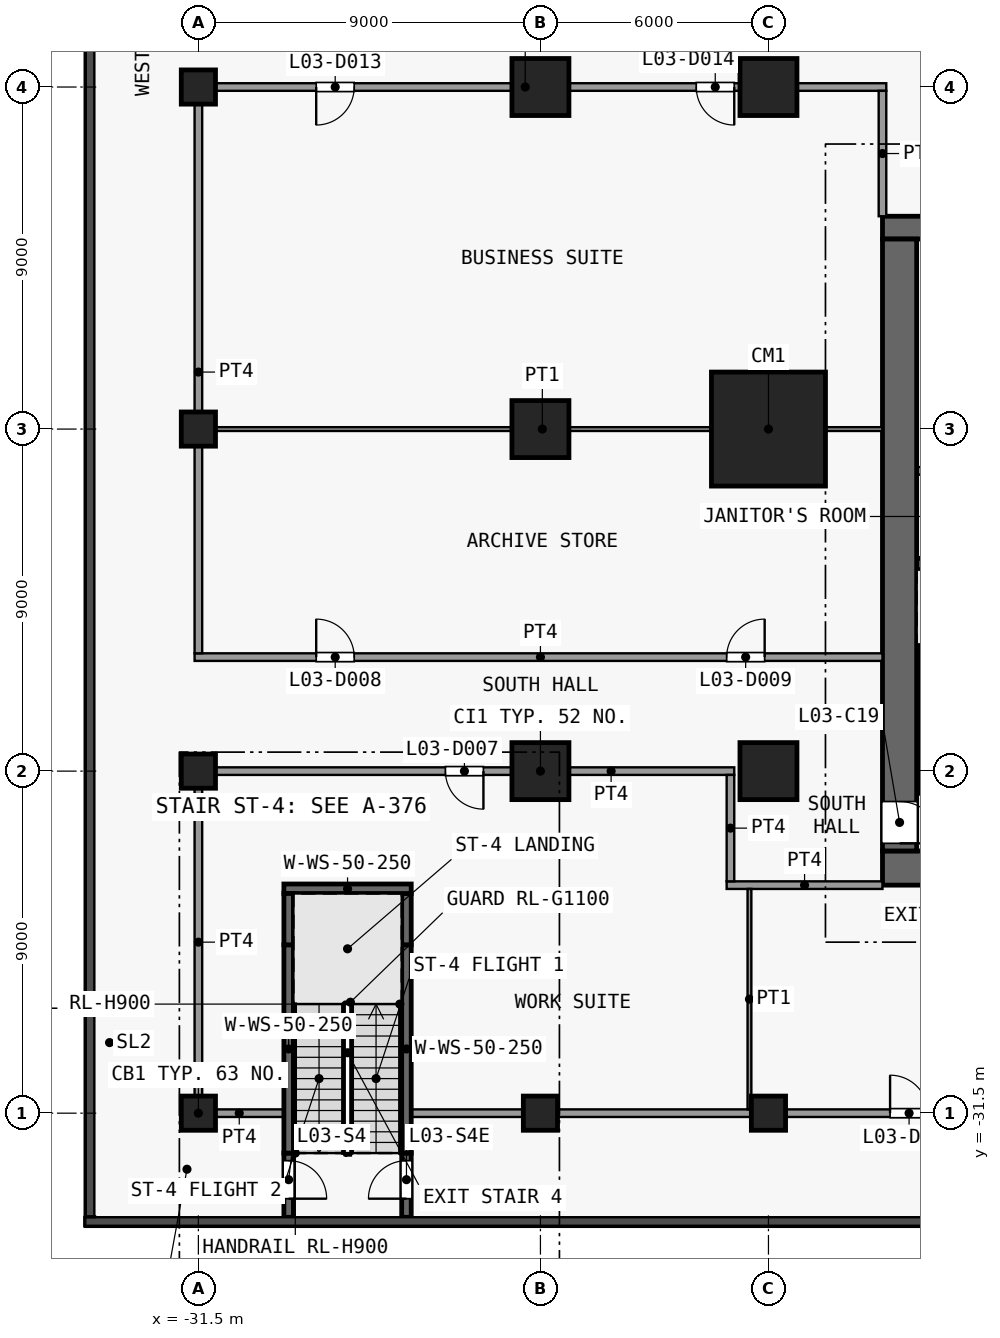
"""IFC4 building model, lengths in metres.
Left out: names, types, materials, properties, quantities, classifications, styles, units other than length and angle.
Written with IfcOpenShell. Run it as: python <this file> out.ifc"""

import sys

from ifc_helpers import new_model, si_unit, direction, frame, frame_2d, origin, origin_2d, place, context, subcontext, project, spatial, rectangle, extrude, element, fill, save


model = new_model("IFC4")
c1 = context("Model", 3, precision=1e-05, world=origin(), true_north=direction((0.0, 1.0)))
c2 = subcontext(c1, "Body", "Model", "MODEL_VIEW")
j1 = project(units=[si_unit("LENGTHUNIT", "METRE"), si_unit("PLANEANGLEUNIT", "RADIAN")], contexts=[c1])
p1 = place(None, origin())
s1 = spatial("IfcSite", under=j1, at=p1, CompositionType="ELEMENT")
p2 = place(p1, origin())
s2 = spatial("IfcBuilding", under=s1, at=p2, CompositionType="ELEMENT")
p3 = place(p2, frame((0.0, 0.0, 18.5)))
s3 = spatial("IfcBuildingStorey", under=s2, at=p3, CompositionType="ELEMENT", Elevation=18.5)
for number, where, z_axis, x_axis in (
    (1, (-31.5, -31.5, 0.0), (0.0, 0.0, 1.0), (1.0, 0.0, 0.0)),
    (2, (-31.5, -22.5, 0.0), (0.0, 0.0, 1.0), (1.0, 0.0, 0.0)),
    (3, (-31.5, -13.5, 0.0), (0.0, 0.0, 1.0), (1.0, 0.0, 0.0)),
    (4, (-31.5, -4.5, 0.0), (0.0, 0.0, 1.0), (1.0, 0.0, 0.0)),
    (5, (-22.5, -31.5, 0.0), (0.0, 0.0, 1.0), (1.0, 0.0, 0.0)),
):
    element("IfcColumn", number, at=place(p3, frame(where, z_axis=z_axis, x_axis=x_axis)), inside=s3, PredefinedType="COLUMN", context=c2, shape_type="SweptSolid", body=[
        extrude(rectangle(XDim=0.9, YDim=0.9, at=origin_2d()), origin(), (0.0, 0.0, 1.0), 5.0),
    ])
for number, where, z_axis, x_axis in (
    (6, (-22.5, -22.5, 0.0), (0.0, 0.0, 1.0), (1.0, 0.0, 0.0)),
    (7, (-22.5, -13.5, 0.0), (0.0, 0.0, 1.0), (1.0, 0.0, 0.0)),
    (8, (-22.5, -4.5, 0.0), (0.0, 0.0, 1.0), (1.0, 0.0, 0.0)),
):
    element("IfcColumn", number, at=place(p3, frame(where, z_axis=z_axis, x_axis=x_axis)), inside=s3, PredefinedType="COLUMN", context=c2, shape_type="SweptSolid", body=[
        extrude(rectangle(XDim=1.5, YDim=1.5, at=origin_2d()), origin(), (0.0, 0.0, 1.0), 5.0),
    ])
p4 = place(p3, frame((-16.5, -31.5, 0.0), z_axis=(0.0, 0.0, 1.0), x_axis=(1.0, 0.0, 0.0)))
e9 = element("IfcColumn", 9, at=p4, inside=s3, PredefinedType="COLUMN", context=c2, shape_type="SweptSolid", body=[
    extrude(rectangle(XDim=0.9, YDim=0.9, at=origin_2d()), origin(), (0.0, 0.0, 1.0), 5.0),
])
p5 = place(p3, frame((-16.5, -22.5, 0.0), z_axis=(0.0, 0.0, 1.0), x_axis=(1.0, 0.0, 0.0)))
e10 = element("IfcColumn", 10, at=p5, inside=s3, PredefinedType="COLUMN", context=c2, shape_type="SweptSolid", body=[
    extrude(rectangle(XDim=1.5, YDim=1.5, at=origin_2d()), origin(), (0.0, 0.0, 1.0), 5.0),
])
p6 = place(p3, frame((-16.5, -13.5, 0.0), z_axis=(0.0, 0.0, 1.0), x_axis=(1.0, 0.0, 0.0)))
e11 = element("IfcColumn", 11, at=p6, inside=s3, PredefinedType="COLUMN", context=c2, shape_type="SweptSolid", body=[
    extrude(rectangle(XDim=3.0, YDim=3.0, at=origin_2d()), origin(), (0.0, 0.0, 1.0), 5.0),
])
p7 = place(p3, frame((-16.5, -4.5, 0.0), z_axis=(0.0, 0.0, 1.0), x_axis=(1.0, 0.0, 0.0)))
e12 = element("IfcColumn", 12, at=p7, inside=s3, PredefinedType="COLUMN", context=c2, shape_type="SweptSolid", body=[
    extrude(rectangle(XDim=1.5, YDim=1.5, at=origin_2d()), origin(), (0.0, 0.0, 1.0), 5.0),
])
p8 = place(p3, frame((-13.5, -25.05, 0.0), z_axis=(0.0, 0.0, 1.0), x_axis=(1.0, 0.0, 0.0)))
e13 = element("IfcWall", 13, at=p8, inside=s3, PredefinedType="SHEAR", context=c2, shape_type="SweptSolid", body=[
    extrude(rectangle(XDim=27.0, YDim=0.9, at=frame_2d((13.5, 0.0))), origin(), (0.0, 0.0, 1.0), 4.65),
])
p9 = place(p3, frame((-13.5, -8.2, 0.0), z_axis=(0.0, 0.0, 1.0), x_axis=(1.0, 0.0, 0.0)))
e14 = element("IfcWall", 14, at=p9, inside=s3, PredefinedType="SHEAR", context=c2, shape_type="SweptSolid", body=[
    extrude(rectangle(XDim=27.0, YDim=0.6, at=frame_2d((13.5, 0.0))), origin(), (0.0, 0.0, 1.0), 4.65),
])
p10 = place(p9, frame((7.8, 0.0, 0.0)))
e15 = element("IfcOpeningElement", 15, at=p10, cuts=e14, PredefinedType="OPENING", context=c2, shape_type="SweptSolid", body=[
    extrude(rectangle(XDim=1.8, YDim=2.1, at=frame_2d((0.9, 1.05))), frame((0.0, 0.31, 0.0), z_axis=(0.0, -1.0, 0.0), x_axis=(1.0, 0.0, 0.0)), (0.0, 0.0, 1.0), 0.62),
])
p11 = place(p9, frame((17.4, 0.0, 0.0)))
e16 = element("IfcOpeningElement", 16, at=p11, cuts=e14, PredefinedType="OPENING", context=c2, shape_type="SweptSolid", body=[
    extrude(rectangle(XDim=1.8, YDim=2.1, at=frame_2d((0.9, 1.05))), frame((0.0, 0.31, 0.0), z_axis=(0.0, -1.0, 0.0), x_axis=(1.0, 0.0, 0.0)), (0.0, 0.0, 1.0), 0.62),
])
p12 = place(p9, frame((2.725, 0.0, 0.0)))
e17 = element("IfcOpeningElement", 17, at=p12, cuts=e14, PredefinedType="OPENING", context=c2, shape_type="SweptSolid", body=[
    extrude(rectangle(XDim=0.9, YDim=2.1, at=frame_2d((0.45, 1.05))), frame((0.0, 0.31, 0.0), z_axis=(0.0, -1.0, 0.0), x_axis=(1.0, 0.0, 0.0)), (0.0, 0.0, 1.0), 0.62),
])
p13 = place(p9, frame((23.375, 0.0, 0.0)))
e18 = element("IfcOpeningElement", 18, at=p13, cuts=e14, PredefinedType="OPENING", context=c2, shape_type="SweptSolid", body=[
    extrude(rectangle(XDim=0.9, YDim=2.1, at=frame_2d((0.45, 1.05))), frame((0.0, 0.31, 0.0), z_axis=(0.0, -1.0, 0.0), x_axis=(1.0, 0.0, 0.0)), (0.0, 0.0, 1.0), 0.62),
])
p14 = place(p3, frame((-13.05, -8.5, 0.0), z_axis=(0.0, 0.0, 1.0), x_axis=(0.0, -1.0, 0.0)))
e19 = element("IfcWall", 19, at=p14, inside=s3, PredefinedType="SHEAR", context=c2, shape_type="SweptSolid", body=[
    extrude(rectangle(XDim=16.1, YDim=0.9, at=frame_2d((8.05, 0.0))), origin(), (0.0, 0.0, 1.0), 4.65),
])
p15 = place(p14, frame((14.8, 0.0, 0.0)))
e20 = element("IfcOpeningElement", 20, at=p15, cuts=e19, PredefinedType="OPENING", context=c2, shape_type="SweptSolid", body=[
    extrude(rectangle(XDim=1.1, YDim=2.1, at=frame_2d((0.55, 1.05))), frame((0.0, 0.46, 0.0), z_axis=(0.0, -1.0, 0.0), x_axis=(1.0, 0.0, 0.0)), (0.0, 0.0, 1.0), 0.92),
])
p16 = place(p3, frame((-12.6, -17.05, 0.0), z_axis=(0.0, 0.0, 1.0), x_axis=(1.0, 0.0, 0.0)))
e21 = element("IfcWall", 21, at=p16, inside=s3, PredefinedType="SHEAR", context=c2, shape_type="SweptSolid", body=[
    extrude(rectangle(XDim=2.85, YDim=0.3, at=frame_2d((1.425, 0.0))), origin(), (0.0, 0.0, 1.0), 4.65),
])
p17 = place(p3, frame((-12.6, -14.6, 0.0), z_axis=(0.0, 0.0, 1.0), x_axis=(1.0, 0.0, 0.0)))
e22 = element("IfcWall", 22, at=p17, inside=s3, PredefinedType="PARTITIONING", context=c2, shape_type="SweptSolid", body=[
    extrude(rectangle(XDim=1.45, YDim=0.2, at=frame_2d((0.725, 0.0))), origin(), (0.0, 0.0, 1.0), 4.65),
])
p18 = place(p3, frame((-29.125, -32.55, 0.0), z_axis=(0.0, 0.0, 1.0), x_axis=(0.0, -1.0, 0.0)))
e23 = element("IfcWall", 23, at=p18, inside=s3, PredefinedType="SHEAR", context=c2, shape_type="SweptSolid", body=[
    extrude(rectangle(XDim=1.69, YDim=0.25, at=frame_2d((0.845, 0.0))), origin(), (0.0, 0.0, 1.0), 4.65),
])
p19 = place(p18, frame((0.2, 0.0, 0.0)))
e24 = element("IfcOpeningElement", 24, at=p19, cuts=e23, PredefinedType="OPENING", context=c2, shape_type="SweptSolid", body=[
    extrude(rectangle(XDim=1.0, YDim=2.1, at=frame_2d((0.5, 1.05))), frame((0.0, 0.135, 0.0), z_axis=(0.0, -1.0, 0.0), x_axis=(1.0, 0.0, 0.0)), (0.0, 0.0, 1.0), 0.27),
])
p20 = place(p3, frame((-29.125, -32.55, 0.0), z_axis=(0.0, 0.0, 1.0), x_axis=(0.0, 1.0, 0.0)))
e25 = element("IfcWall", 25, at=p20, inside=s3, PredefinedType="SHEAR", context=c2, shape_type="SweptSolid", body=[
    extrude(rectangle(XDim=5.48, YDim=0.25, at=frame_2d((2.74, 0.0))), origin(), (0.0, 0.0, 1.0), 4.65),
])
p21 = place(p3, frame((-29.125, -27.07, 0.0), z_axis=(0.0, 0.0, 1.0), x_axis=(0.0, 1.0, 0.0)))
e26 = element("IfcWall", 26, at=p21, inside=s3, PredefinedType="SHEAR", context=c2, shape_type="SweptSolid", body=[
    extrude(rectangle(XDim=1.35, YDim=0.25, at=frame_2d((0.675, 0.0))), origin(), (0.0, 0.0, 1.0), 4.65),
])
p22 = place(p3, frame((-26.025, -34.24, 0.0), z_axis=(0.0, 0.0, 1.0), x_axis=(0.0, 1.0, 0.0)))
e27 = element("IfcWall", 27, at=p22, inside=s3, PredefinedType="SHEAR", context=c2, shape_type="SweptSolid", body=[
    extrude(rectangle(XDim=1.69, YDim=0.25, at=frame_2d((0.845, 0.0))), origin(), (0.0, 0.0, 1.0), 4.65),
])
p23 = place(p22, frame((0.49, 0.0, 0.0)))
e28 = element("IfcOpeningElement", 28, at=p23, cuts=e27, PredefinedType="OPENING", context=c2, shape_type="SweptSolid", body=[
    extrude(rectangle(XDim=1.0, YDim=2.1, at=frame_2d((0.5, 1.05))), frame((0.0, 0.135, 0.0), z_axis=(0.0, -1.0, 0.0), x_axis=(1.0, 0.0, 0.0)), (0.0, 0.0, 1.0), 0.27),
])
p24 = place(p3, frame((-26.025, -32.55, 0.0), z_axis=(0.0, 0.0, 1.0), x_axis=(0.0, 1.0, 0.0)))
e29 = element("IfcWall", 29, at=p24, inside=s3, PredefinedType="SHEAR", context=c2, shape_type="SweptSolid", body=[
    extrude(rectangle(XDim=5.48, YDim=0.25, at=frame_2d((2.74, 0.0))), origin(), (0.0, 0.0, 1.0), 4.65),
])
p25 = place(p3, frame((-26.025, -27.07, 0.0), z_axis=(0.0, 0.0, 1.0), x_axis=(0.0, 1.0, 0.0)))
e30 = element("IfcWall", 30, at=p25, inside=s3, PredefinedType="SHEAR", context=c2, shape_type="SweptSolid", body=[
    extrude(rectangle(XDim=1.35, YDim=0.25, at=frame_2d((0.675, 0.0))), origin(), (0.0, 0.0, 1.0), 4.65),
])
p26 = place(p3, frame((-29.25, -25.595, 0.0), z_axis=(0.0, 0.0, 1.0), x_axis=(1.0, 0.0, 0.0)))
e31 = element("IfcWall", 31, at=p26, inside=s3, PredefinedType="SHEAR", context=c2, shape_type="SweptSolid", body=[
    extrude(rectangle(XDim=3.35, YDim=0.25, at=frame_2d((1.675, 0.0))), origin(), (0.0, 0.0, 1.0), 4.65),
])
p27 = place(p3, frame((-31.6, -31.5, 0.0), z_axis=(0.0, 0.0, 1.0), x_axis=(1.0, 0.0, 0.0)))
e32 = element("IfcWall", 32, at=p27, inside=s3, PredefinedType="PARTITIONING", context=c2, shape_type="SweptSolid", body=[
    extrude(rectangle(XDim=2.35, YDim=0.2, at=frame_2d((1.175, 0.0))), origin(), (0.0, 0.0, 1.0), 4.65),
])
p28 = place(p3, frame((-25.9, -31.5, 0.0), z_axis=(0.0, 0.0, 1.0), x_axis=(1.0, 0.0, 0.0)))
e33 = element("IfcWall", 33, at=p28, inside=s3, PredefinedType="PARTITIONING", context=c2, shape_type="SweptSolid", body=[
    extrude(rectangle(XDim=78.15, YDim=0.2, at=frame_2d((39.075, 0.0))), origin(), (0.0, 0.0, 1.0), 4.65),
])
p29 = place(p28, frame((12.6, 0.0, 0.0)))
e34 = element("IfcOpeningElement", 34, at=p29, cuts=e33, PredefinedType="OPENING", context=c2, shape_type="SweptSolid", body=[
    extrude(rectangle(XDim=1.0, YDim=2.1, at=frame_2d((0.5, 1.05))), frame((0.0, 0.11, 0.0), z_axis=(0.0, -1.0, 0.0), x_axis=(1.0, 0.0, 0.0)), (0.0, 0.0, 1.0), 0.22),
])
p30 = place(p28, frame((25.2, 0.0, 0.0)))
e35 = element("IfcOpeningElement", 35, at=p30, cuts=e33, PredefinedType="OPENING", context=c2, shape_type="SweptSolid", body=[
    extrude(rectangle(XDim=1.0, YDim=2.1, at=frame_2d((0.5, 1.05))), frame((0.0, 0.11, 0.0), z_axis=(0.0, -1.0, 0.0), x_axis=(1.0, 0.0, 0.0)), (0.0, 0.0, 1.0), 0.22),
])
p31 = place(p28, frame((34.0, 0.0, 0.0)))
e36 = element("IfcOpeningElement", 36, at=p31, cuts=e33, PredefinedType="OPENING", context=c2, shape_type="SweptSolid", body=[
    extrude(rectangle(XDim=1.8, YDim=2.1, at=frame_2d((0.9, 1.05))), frame((0.0, 0.11, 0.0), z_axis=(0.0, -1.0, 0.0), x_axis=(1.0, 0.0, 0.0)), (0.0, 0.0, 1.0), 0.22),
])
p32 = place(p28, frame((51.0, 0.0, 0.0)))
e37 = element("IfcOpeningElement", 37, at=p32, cuts=e33, PredefinedType="OPENING", context=c2, shape_type="SweptSolid", body=[
    extrude(rectangle(XDim=1.8, YDim=2.1, at=frame_2d((0.9, 1.05))), frame((0.0, 0.11, 0.0), z_axis=(0.0, -1.0, 0.0), x_axis=(1.0, 0.0, 0.0)), (0.0, 0.0, 1.0), 0.22),
])
p33 = place(p28, frame((60.6, 0.0, 0.0)))
e38 = element("IfcOpeningElement", 38, at=p33, cuts=e33, PredefinedType="OPENING", context=c2, shape_type="SweptSolid", body=[
    extrude(rectangle(XDim=1.8, YDim=2.1, at=frame_2d((0.9, 1.05))), frame((0.0, 0.11, 0.0), z_axis=(0.0, -1.0, 0.0), x_axis=(1.0, 0.0, 0.0)), (0.0, 0.0, 1.0), 0.22),
])
p34 = place(p28, frame((73.0, 0.0, 0.0)))
e39 = element("IfcOpeningElement", 39, at=p34, cuts=e33, PredefinedType="OPENING", context=c2, shape_type="SweptSolid", body=[
    extrude(rectangle(XDim=1.8, YDim=2.1, at=frame_2d((0.9, 1.05))), frame((0.0, 0.11, 0.0), z_axis=(0.0, -1.0, 0.0), x_axis=(1.0, 0.0, 0.0)), (0.0, 0.0, 1.0), 0.22),
])
p35 = place(p3, frame((-17.6, -25.5, 0.0), z_axis=(0.0, 0.0, 1.0), x_axis=(1.0, 0.0, 0.0)))
e40 = element("IfcWall", 40, at=p35, inside=s3, PredefinedType="PARTITIONING", context=c2, shape_type="SweptSolid", body=[
    extrude(rectangle(XDim=4.1, YDim=0.2, at=frame_2d((2.05, 0.0))), origin(), (0.0, 0.0, 1.0), 4.65),
])
p36 = place(p3, frame((-31.6, -22.5, 0.0), z_axis=(0.0, 0.0, 1.0), x_axis=(1.0, 0.0, 0.0)))
e41 = element("IfcWall", 41, at=p36, inside=s3, PredefinedType="PARTITIONING", context=c2, shape_type="SweptSolid", body=[
    extrude(rectangle(XDim=14.2, YDim=0.2, at=frame_2d((7.1, 0.0))), origin(), (0.0, 0.0, 1.0), 4.65),
])
p37 = place(p36, frame((6.6, 0.0, 0.0)))
e42 = element("IfcOpeningElement", 42, at=p37, cuts=e41, PredefinedType="OPENING", context=c2, shape_type="SweptSolid", body=[
    extrude(rectangle(XDim=1.0, YDim=2.1, at=frame_2d((0.5, 1.05))), frame((0.0, 0.11, 0.0), z_axis=(0.0, -1.0, 0.0), x_axis=(1.0, 0.0, 0.0)), (0.0, 0.0, 1.0), 0.22),
])
p38 = place(p3, frame((-31.6, -19.5, 0.0), z_axis=(0.0, 0.0, 1.0), x_axis=(1.0, 0.0, 0.0)))
e43 = element("IfcWall", 43, at=p38, inside=s3, PredefinedType="PARTITIONING", context=c2, shape_type="SweptSolid", body=[
    extrude(rectangle(XDim=18.1, YDim=0.2, at=frame_2d((9.05, 0.0))), origin(), (0.0, 0.0, 1.0), 4.65),
])
p39 = place(p38, frame((3.2, 0.0, 0.0)))
e44 = element("IfcOpeningElement", 44, at=p39, cuts=e43, PredefinedType="OPENING", context=c2, shape_type="SweptSolid", body=[
    extrude(rectangle(XDim=1.0, YDim=2.1, at=frame_2d((0.5, 1.05))), frame((0.0, 0.11, 0.0), z_axis=(0.0, -1.0, 0.0), x_axis=(1.0, 0.0, 0.0)), (0.0, 0.0, 1.0), 0.22),
])
p40 = place(p38, frame((14.0, 0.0, 0.0)))
e45 = element("IfcOpeningElement", 45, at=p40, cuts=e43, PredefinedType="OPENING", context=c2, shape_type="SweptSolid", body=[
    extrude(rectangle(XDim=1.0, YDim=2.1, at=frame_2d((0.5, 1.05))), frame((0.0, 0.11, 0.0), z_axis=(0.0, -1.0, 0.0), x_axis=(1.0, 0.0, 0.0)), (0.0, 0.0, 1.0), 0.22),
])
p41 = place(p3, frame((-31.4, -13.5, 0.0), z_axis=(0.0, 0.0, 1.0), x_axis=(1.0, 0.0, 0.0)))
e46 = element("IfcWall", 46, at=p41, inside=s3, PredefinedType="PARTITIONING", context=c2, shape_type="SweptSolid", body=[
    extrude(rectangle(XDim=17.9, YDim=0.1, at=frame_2d((8.95, 0.0))), origin(), (0.0, 0.0, 1.0), 4.65),
])
p42 = place(p3, frame((-31.6, -4.5, 0.0), z_axis=(0.0, 0.0, 1.0), x_axis=(1.0, 0.0, 0.0)))
e47 = element("IfcWall", 47, at=p42, inside=s3, PredefinedType="PARTITIONING", context=c2, shape_type="SweptSolid", body=[
    extrude(rectangle(XDim=18.2, YDim=0.2, at=frame_2d((9.1, 0.0))), origin(), (0.0, 0.0, 1.0), 4.65),
])
p43 = place(p42, frame((3.2, 0.0, 0.0)))
e48 = element("IfcOpeningElement", 48, at=p43, cuts=e47, PredefinedType="OPENING", context=c2, shape_type="SweptSolid", body=[
    extrude(rectangle(XDim=1.0, YDim=2.1, at=frame_2d((0.5, 1.05))), frame((0.0, 0.11, 0.0), z_axis=(0.0, -1.0, 0.0), x_axis=(1.0, 0.0, 0.0)), (0.0, 0.0, 1.0), 0.22),
])
p44 = place(p42, frame((13.2, 0.0, 0.0)))
e49 = element("IfcOpeningElement", 49, at=p44, cuts=e47, PredefinedType="OPENING", context=c2, shape_type="SweptSolid", body=[
    extrude(rectangle(XDim=1.0, YDim=2.1, at=frame_2d((0.5, 1.05))), frame((0.0, 0.11, 0.0), z_axis=(0.0, -1.0, 0.0), x_axis=(1.0, 0.0, 0.0)), (0.0, 0.0, 1.0), 0.22),
])
p45 = place(p3, frame((-31.5, -31.4, 0.0), z_axis=(0.0, 0.0, 1.0), x_axis=(0.0, 1.0, 0.0)))
e50 = element("IfcWall", 50, at=p45, inside=s3, PredefinedType="PARTITIONING", context=c2, shape_type="SweptSolid", body=[
    extrude(rectangle(XDim=8.8, YDim=0.2, at=frame_2d((4.4, 0.0))), origin(), (0.0, 0.0, 1.0), 4.65),
])
p46 = place(p3, frame((-31.5, -19.4, 0.0), z_axis=(0.0, 0.0, 1.0), x_axis=(0.0, 1.0, 0.0)))
e51 = element("IfcWall", 51, at=p46, inside=s3, PredefinedType="PARTITIONING", context=c2, shape_type="SweptSolid", body=[
    extrude(rectangle(XDim=14.8, YDim=0.2, at=frame_2d((7.4, 0.0))), origin(), (0.0, 0.0, 1.0), 4.65),
])
p47 = place(p3, frame((-17.5, -25.4, 0.0), z_axis=(0.0, 0.0, 1.0), x_axis=(0.0, 1.0, 0.0)))
e52 = element("IfcWall", 52, at=p47, inside=s3, PredefinedType="PARTITIONING", context=c2, shape_type="SweptSolid", body=[
    extrude(rectangle(XDim=2.8, YDim=0.2, at=frame_2d((1.4, 0.0))), origin(), (0.0, 0.0, 1.0), 4.65),
])
p48 = place(p3, frame((-17.0, -31.4, 0.0), z_axis=(0.0, 0.0, 1.0), x_axis=(0.0, 1.0, 0.0)))
e53 = element("IfcWall", 53, at=p48, inside=s3, PredefinedType="PARTITIONING", context=c2, shape_type="SweptSolid", body=[
    extrude(rectangle(XDim=5.8, YDim=0.1, at=frame_2d((2.9, 0.0))), origin(), (0.0, 0.0, 1.0), 4.65),
])
p49 = place(p3, frame((-13.5, -7.9, 0.0), z_axis=(0.0, 0.0, 1.0), x_axis=(0.0, 1.0, 0.0)))
e54 = element("IfcWall", 54, at=p49, inside=s3, PredefinedType="PARTITIONING", context=c2, shape_type="SweptSolid", body=[
    extrude(rectangle(XDim=3.3, YDim=0.2, at=frame_2d((1.65, 0.0))), origin(), (0.0, 0.0, 1.0), 4.65),
])
p50 = place(p15, origin())
e55 = element("IfcDoor", 55, at=p50, inside=s3, OperationType="SINGLE_SWING_RIGHT", PredefinedType="DOOR", context=c2, shape_type="SweptSolid", body=[
    extrude(rectangle(XDim=1.1, YDim=2.1, at=frame_2d((0.55, 1.05))), frame((0.0, 0.025, 0.0), z_axis=(0.0, -1.0, 0.0), x_axis=(1.0, 0.0, 0.0)), (0.0, 0.0, 1.0), 0.05),
])
fill(e20, e55)
p51 = place(p19, origin())
e56 = element("IfcDoor", 56, at=p51, inside=s3, OperationType="SINGLE_SWING_RIGHT", PredefinedType="DOOR", context=c2, shape_type="SweptSolid", body=[
    extrude(rectangle(XDim=1.0, YDim=2.1, at=frame_2d((0.5, 1.05))), frame((0.0, 0.025, 0.0), z_axis=(0.0, -1.0, 0.0), x_axis=(1.0, 0.0, 0.0)), (0.0, 0.0, 1.0), 0.05),
])
fill(e24, e56)
p52 = place(p23, origin())
e57 = element("IfcDoor", 57, at=p52, inside=s3, OperationType="SINGLE_SWING_LEFT", PredefinedType="DOOR", context=c2, shape_type="SweptSolid", body=[
    extrude(rectangle(XDim=1.0, YDim=2.1, at=frame_2d((0.5, 1.05))), frame((0.0, 0.025, 0.0), z_axis=(0.0, -1.0, 0.0), x_axis=(1.0, 0.0, 0.0)), (0.0, 0.0, 1.0), 0.05),
])
fill(e28, e57)
p53 = place(p29, origin())
e58 = element("IfcDoor", 58, at=p53, inside=s3, OperationType="SINGLE_SWING_RIGHT", PredefinedType="DOOR", context=c2, shape_type="SweptSolid", body=[
    extrude(rectangle(XDim=1.0, YDim=2.1, at=frame_2d((0.5, 1.05))), frame((0.0, 0.025, 0.0), z_axis=(0.0, -1.0, 0.0), x_axis=(1.0, 0.0, 0.0)), (0.0, 0.0, 1.0), 0.05),
])
fill(e34, e58)
p54 = place(p37, origin())
e59 = element("IfcDoor", 59, at=p54, inside=s3, OperationType="SINGLE_SWING_RIGHT", PredefinedType="DOOR", context=c2, shape_type="SweptSolid", body=[
    extrude(rectangle(XDim=1.0, YDim=2.1, at=frame_2d((0.5, 1.05))), frame((0.0, 0.025, 0.0), z_axis=(0.0, -1.0, 0.0), x_axis=(1.0, 0.0, 0.0)), (0.0, 0.0, 1.0), 0.05),
])
fill(e42, e59)
p55 = place(p39, origin())
e60 = element("IfcDoor", 60, at=p55, inside=s3, OperationType="SINGLE_SWING_RIGHT", PredefinedType="DOOR", context=c2, shape_type="SweptSolid", body=[
    extrude(rectangle(XDim=1.0, YDim=2.1, at=frame_2d((0.5, 1.05))), frame((0.0, 0.025, 0.0), z_axis=(0.0, -1.0, 0.0), x_axis=(1.0, 0.0, 0.0)), (0.0, 0.0, 1.0), 0.05),
])
fill(e44, e60)
p56 = place(p40, origin())
e61 = element("IfcDoor", 61, at=p56, inside=s3, OperationType="SINGLE_SWING_LEFT", PredefinedType="DOOR", context=c2, shape_type="SweptSolid", body=[
    extrude(rectangle(XDim=1.0, YDim=2.1, at=frame_2d((0.5, 1.05))), frame((0.0, 0.025, 0.0), z_axis=(0.0, -1.0, 0.0), x_axis=(1.0, 0.0, 0.0)), (0.0, 0.0, 1.0), 0.05),
])
fill(e45, e61)
p57 = place(p43, origin())
e62 = element("IfcDoor", 62, at=p57, inside=s3, OperationType="SINGLE_SWING_LEFT", PredefinedType="DOOR", context=c2, shape_type="SweptSolid", body=[
    extrude(rectangle(XDim=1.0, YDim=2.1, at=frame_2d((0.5, 1.05))), frame((0.0, 0.025, 0.0), z_axis=(0.0, -1.0, 0.0), x_axis=(1.0, 0.0, 0.0)), (0.0, 0.0, 1.0), 0.05),
])
fill(e48, e62)
p58 = place(p44, origin())
e63 = element("IfcDoor", 63, at=p58, inside=s3, OperationType="SINGLE_SWING_RIGHT", PredefinedType="DOOR", context=c2, shape_type="SweptSolid", body=[
    extrude(rectangle(XDim=1.0, YDim=2.1, at=frame_2d((0.5, 1.05))), frame((0.0, 0.025, 0.0), z_axis=(0.0, -1.0, 0.0), x_axis=(1.0, 0.0, 0.0)), (0.0, 0.0, 1.0), 0.05),
])
fill(e49, e63)
save(model, sys.argv[1])
